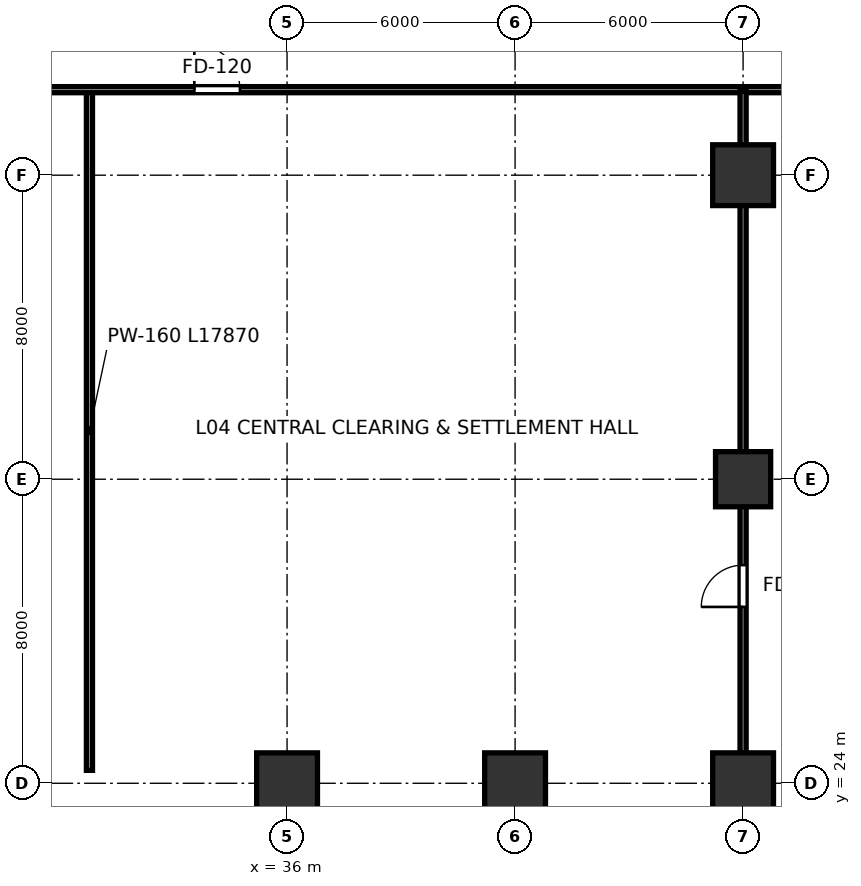
"""IFC4 building model, lengths in metres.
Left out: names, types, materials, properties, quantities, classifications, styles, units other than length and angle.
Written with IfcOpenShell. Run it as: python <this file> out.ifc"""

import sys

from ifc_helpers import new_model, si_unit, direction, frame, frame_2d, origin, origin_2d, place, context, subcontext, project, spatial, rectangle, extrude, source, transform, mapped, element, fill, save


model = new_model("IFC4")
c1 = context("Model", 3, precision=1e-05, world=origin(), true_north=direction((0.0, 1.0)))
c2 = subcontext(c1, "Body", "Model", "MODEL_VIEW")
j1 = project(units=[si_unit("LENGTHUNIT", "METRE"), si_unit("PLANEANGLEUNIT", "RADIAN")], contexts=[c1])
p1 = place(None, origin())
s1 = spatial("IfcSite", under=j1, at=p1, CompositionType="ELEMENT")
p2 = place(p1, origin())
s2 = spatial("IfcBuilding", under=s1, at=p2, CompositionType="ELEMENT")
p3 = place(p2, frame((0.0, 0.0, 17.4)))
s3 = spatial("IfcBuildingStorey", under=s2, at=p3, CompositionType="ELEMENT", Elevation=17.4)
m1 = source(origin(), c2, "Body", "SweptSolid", [
    extrude(rectangle(XDim=1.6, YDim=1.6, at=origin_2d()), origin(), (0.0, 0.0, 1.0), 4.799),
])
for number, where, z_axis, x_axis in (
    (1, (36.0, 24.0, 0.001), (0.0, 0.0, 1.0), (1.0, 0.0, 0.0)),
    (2, (42.0, 24.0, 0.001), (0.0, 0.0, 1.0), (1.0, 0.0, 0.0)),
    (3, (48.0, 24.0, 0.001), (0.0, 0.0, 1.0), (1.0, 0.0, 0.0)),
):
    element("IfcColumn", number, at=place(p3, frame(where, z_axis=z_axis, x_axis=x_axis)), inside=s3, PredefinedType="COLUMN", context=c2, shape_type="MappedRepresentation", body=[
        mapped(m1, transform((0.0, 0.0, 0.0), scale=1.0)),
    ])
m2 = source(origin(), c2, "Body", "SweptSolid", [
    extrude(rectangle(XDim=1.45, YDim=1.45, at=origin_2d()), origin(), (0.0, 0.0, 1.0), 4.799),
])
p4 = place(p3, frame((48.0, 32.0, 0.001), z_axis=(0.0, 0.0, 1.0), x_axis=(1.0, 0.0, 0.0)))
e4 = element("IfcColumn", 4, at=p4, inside=s3, PredefinedType="COLUMN", context=c2, shape_type="MappedRepresentation", body=[
    mapped(m2, transform((0.0, 0.0, 0.0), scale=1.0)),
])
m3 = source(origin(), c2, "Body", "SweptSolid", [
    extrude(rectangle(XDim=1.6, YDim=1.6, at=origin_2d()), origin(), (0.0, 0.0, 1.0), 4.799),
])
p5 = place(p3, frame((48.0, 40.0, 0.001), z_axis=(0.0, 0.0, 1.0), x_axis=(1.0, 0.0, 0.0)))
e5 = element("IfcColumn", 5, at=p5, inside=s3, PredefinedType="COLUMN", context=c2, shape_type="MappedRepresentation", body=[
    mapped(m3, transform((0.0, 0.0, 0.0), scale=1.0)),
])
p6 = place(p3, frame((30.8, 24.34, 0.0), z_axis=(0.0, 0.0, 1.0), x_axis=(0.0, 1.0, 0.0)))
e6 = element("IfcWall", 6, at=p6, inside=s3, PredefinedType="PARTITIONING", context=c2, shape_type="SweptSolid", body=[
    extrude(rectangle(XDim=17.87, YDim=0.16, at=frame_2d((8.935, 0.0))), origin(), (0.0, 0.0, 1.0), 3.175),
])
p7 = place(p3, frame((27.06, 42.25, 0.0), z_axis=(0.0, 0.0, 1.0), x_axis=(1.0, 0.0, 0.0)))
e7 = element("IfcWall", 7, at=p7, inside=s3, PredefinedType="PARTITIONING", context=c2, shape_type="SweptSolid", body=[
    extrude(rectangle(XDim=52.55, YDim=0.16, at=frame_2d((26.275, 0.0))), origin(), (0.0, 0.0, 1.0), 3.675),
])
p8 = place(p7, frame((6.5, 0.0, 0.0)))
e8 = element("IfcOpeningElement", 8, at=p8, cuts=e7, PredefinedType="OPENING", context=c2, shape_type="SweptSolid", body=[
    extrude(rectangle(XDim=1.2, YDim=2.2, at=frame_2d((0.6, 1.1))), frame((0.0, 0.09, 0.0), z_axis=(0.0, -1.0, 0.0), x_axis=(1.0, 0.0, 0.0)), (0.0, 0.0, 1.0), 0.18),
])
p9 = place(p7, frame((24.5, 0.0, 0.0)))
e9 = element("IfcOpeningElement", 9, at=p9, cuts=e7, PredefinedType="OPENING", context=c2, shape_type="SweptSolid", body=[
    extrude(rectangle(XDim=1.2, YDim=2.2, at=frame_2d((0.6, 1.1))), frame((0.0, 0.09, 0.0), z_axis=(0.0, -1.0, 0.0), x_axis=(1.0, 0.0, 0.0)), (0.0, 0.0, 1.0), 0.18),
])
p10 = place(p3, frame((48.0, 24.44, 0.0), z_axis=(0.0, 0.0, 1.0), x_axis=(0.0, 1.0, 0.0)))
e10 = element("IfcWall", 10, at=p10, inside=s3, PredefinedType="PARTITIONING", context=c2, shape_type="SweptSolid", body=[
    extrude(rectangle(XDim=17.77, YDim=0.16, at=frame_2d((8.885, 0.0))), origin(), (0.0, 0.0, 1.0), 3.175),
])
p11 = place(p10, frame((4.2, 0.0, 0.0)))
e11 = element("IfcOpeningElement", 11, at=p11, cuts=e10, PredefinedType="OPENING", context=c2, shape_type="SweptSolid", body=[
    extrude(rectangle(XDim=1.1, YDim=2.2, at=frame_2d((0.55, 1.1))), frame((0.0, 0.09, 0.0), z_axis=(0.0, -1.0, 0.0), x_axis=(1.0, 0.0, 0.0)), (0.0, 0.0, 1.0), 0.18),
])
m4 = source(origin(), c2, "Body", "SweptSolid", [
    extrude(rectangle(XDim=1.2, YDim=2.2, at=frame_2d((0.6, 1.1))), frame((0.0, 0.025, 0.0), z_axis=(0.0, -1.0, 0.0), x_axis=(1.0, 0.0, 0.0)), (0.0, 0.0, 1.0), 0.05),
])
p12 = place(p8, origin())
e12 = element("IfcDoor", 12, at=p12, inside=s3, OperationType="SINGLE_SWING_LEFT", PredefinedType="DOOR", context=c2, shape_type="MappedRepresentation", body=[
    mapped(m4, transform((0.0, 0.0, 0.0), scale=1.0)),
])
fill(e8, e12)
m5 = source(origin(), c2, "Body", "SweptSolid", [
    extrude(rectangle(XDim=1.1, YDim=2.2, at=frame_2d((0.55, 1.1))), frame((0.0, 0.025, 0.0), z_axis=(0.0, -1.0, 0.0), x_axis=(1.0, 0.0, 0.0)), (0.0, 0.0, 1.0), 0.05),
])
p13 = place(p11, origin())
e13 = element("IfcDoor", 13, at=p13, inside=s3, OperationType="SINGLE_SWING_LEFT", PredefinedType="DOOR", context=c2, shape_type="MappedRepresentation", body=[
    mapped(m5, transform((0.0, 0.0, 0.0), scale=1.0)),
])
fill(e11, e13)
save(model, sys.argv[1])
